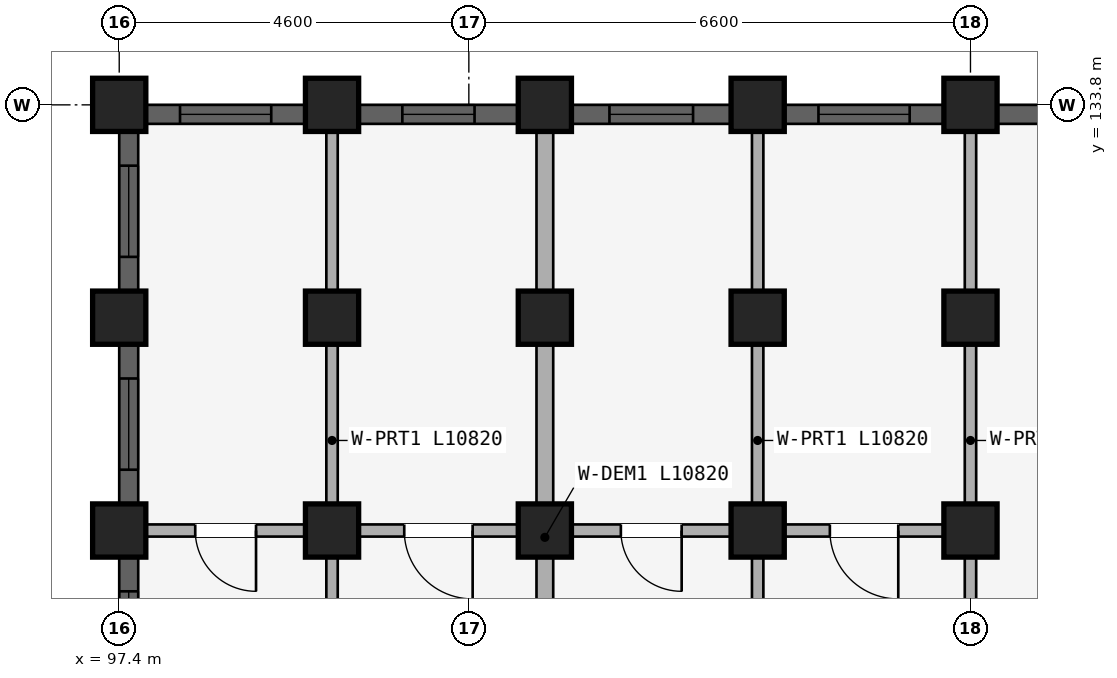
"""IFC4 building model, lengths in metres.
Left out: names, types, materials, properties, quantities, classifications, styles, units other than length and angle.
Written with IfcOpenShell. Run it as: python <this file> out.ifc"""

import sys

from ifc_helpers import new_model, si_unit, direction, frame, frame_2d, origin, origin_2d, place, context, subcontext, project, spatial, rectangle, extrude, element, fill, save


model = new_model("IFC4")
c1 = context("Model", 3, precision=1e-05, world=origin(), true_north=direction((0.0, 1.0)))
c2 = subcontext(c1, "Body", "Model", "MODEL_VIEW")
j1 = project(units=[si_unit("LENGTHUNIT", "METRE"), si_unit("PLANEANGLEUNIT", "RADIAN")], contexts=[c1])
p1 = place(None, origin())
s1 = spatial("IfcSite", under=j1, at=p1, CompositionType="ELEMENT")
p2 = place(p1, origin())
s2 = spatial("IfcBuilding", under=s1, at=p2, CompositionType="ELEMENT")
p3 = place(p2, frame((0.0, 0.0, 21.3)))
s3 = spatial("IfcBuildingStorey", under=s2, at=p3, CompositionType="ELEMENT", Elevation=21.3)
for number, where, z_axis, x_axis in (
    (1, (108.6, 128.2, 0.0), (0.0, 0.0, 1.0), (1.0, 0.0, 0.0)),
    (2, (108.6, 131.0, 0.0), (0.0, 0.0, 1.0), (1.0, 0.0, 0.0)),
    (3, (108.6, 133.8, 0.0), (0.0, 0.0, 1.0), (1.0, 0.0, 0.0)),
    (4, (105.8, 128.2, 0.0), (0.0, 0.0, 1.0), (1.0, 0.0, 0.0)),
    (5, (105.8, 131.0, 0.0), (0.0, 0.0, 1.0), (1.0, 0.0, 0.0)),
    (6, (105.8, 133.8, 0.0), (0.0, 0.0, 1.0), (1.0, 0.0, 0.0)),
    (7, (103.0, 128.2, 0.0), (0.0, 0.0, 1.0), (1.0, 0.0, 0.0)),
    (8, (103.0, 131.0, 0.0), (0.0, 0.0, 1.0), (1.0, 0.0, 0.0)),
    (9, (103.0, 133.8, 0.0), (0.0, 0.0, 1.0), (1.0, 0.0, 0.0)),
    (10, (100.2, 128.2, 0.0), (0.0, 0.0, 1.0), (1.0, 0.0, 0.0)),
    (11, (100.2, 131.0, 0.0), (0.0, 0.0, 1.0), (1.0, 0.0, 0.0)),
    (12, (100.2, 133.8, 0.0), (0.0, 0.0, 1.0), (1.0, 0.0, 0.0)),
    (13, (97.4, 128.2, 0.0), (0.0, 0.0, 1.0), (1.0, 0.0, 0.0)),
    (14, (97.4, 131.0, 0.0), (0.0, 0.0, 1.0), (1.0, 0.0, 0.0)),
    (15, (97.4, 133.8, 0.0), (0.0, 0.0, 1.0), (1.0, 0.0, 0.0)),
):
    element("IfcColumn", number, at=place(p3, frame(where, z_axis=z_axis, x_axis=x_axis)), inside=s3, PredefinedType="COLUMN", context=c2, shape_type="SweptSolid", body=[
        extrude(rectangle(XDim=0.7, YDim=0.7, at=origin_2d()), origin(), (0.0, 0.0, 1.0), 2.93),
    ])
p4 = place(p3, frame((108.52, 128.2, 0.0), z_axis=(0.0, 0.0, 1.0), x_axis=(-1.0, 0.0, 0.0)))
e16 = element("IfcWall", 16, at=p4, inside=s3, PredefinedType="PLUMBINGWALL", context=c2, shape_type="SweptSolid", body=[
    extrude(rectangle(XDim=2.64, YDim=0.16, at=frame_2d((1.32, 0.0))), origin(), (0.0, 0.0, 1.0), 2.372),
])
p5 = place(p4, frame((0.87, 0.0, 0.0)))
e17 = element("IfcOpeningElement", 17, at=p5, cuts=e16, PredefinedType="OPENING", context=c2, shape_type="SweptSolid", body=[
    extrude(rectangle(XDim=0.9, YDim=2.1, at=frame_2d((0.45, 1.05))), frame((0.0, 0.09, 0.0), z_axis=(0.0, -1.0, 0.0), x_axis=(1.0, 0.0, 0.0)), (0.0, 0.0, 1.0), 0.18),
])
p6 = place(p3, frame((105.72, 128.2, 0.0), z_axis=(0.0, 0.0, 1.0), x_axis=(-1.0, 0.0, 0.0)))
e18 = element("IfcWall", 18, at=p6, inside=s3, PredefinedType="PLUMBINGWALL", context=c2, shape_type="SweptSolid", body=[
    extrude(rectangle(XDim=2.64, YDim=0.16, at=frame_2d((1.32, 0.0))), origin(), (0.0, 0.0, 1.0), 2.372),
])
p7 = place(p6, frame((0.92, 0.0, 0.0)))
e19 = element("IfcOpeningElement", 19, at=p7, cuts=e18, PredefinedType="OPENING", context=c2, shape_type="SweptSolid", body=[
    extrude(rectangle(XDim=0.8, YDim=2.1, at=frame_2d((0.4, 1.05))), frame((0.0, 0.09, 0.0), z_axis=(0.0, -1.0, 0.0), x_axis=(1.0, 0.0, 0.0)), (0.0, 0.0, 1.0), 0.18),
])
p8 = place(p3, frame((102.92, 128.2, 0.0), z_axis=(0.0, 0.0, 1.0), x_axis=(-1.0, 0.0, 0.0)))
e20 = element("IfcWall", 20, at=p8, inside=s3, PredefinedType="PLUMBINGWALL", context=c2, shape_type="SweptSolid", body=[
    extrude(rectangle(XDim=2.64, YDim=0.16, at=frame_2d((1.32, 0.0))), origin(), (0.0, 0.0, 1.0), 2.372),
])
p9 = place(p8, frame((0.87, 0.0, 0.0)))
e21 = element("IfcOpeningElement", 21, at=p9, cuts=e20, PredefinedType="OPENING", context=c2, shape_type="SweptSolid", body=[
    extrude(rectangle(XDim=0.9, YDim=2.1, at=frame_2d((0.45, 1.05))), frame((0.0, 0.09, 0.0), z_axis=(0.0, -1.0, 0.0), x_axis=(1.0, 0.0, 0.0)), (0.0, 0.0, 1.0), 0.18),
])
p10 = place(p3, frame((100.12, 128.2, 0.0), z_axis=(0.0, 0.0, 1.0), x_axis=(-1.0, 0.0, 0.0)))
e22 = element("IfcWall", 22, at=p10, inside=s3, PredefinedType="PLUMBINGWALL", context=c2, shape_type="SweptSolid", body=[
    extrude(rectangle(XDim=2.64, YDim=0.16, at=frame_2d((1.32, 0.0))), origin(), (0.0, 0.0, 1.0), 2.372),
])
p11 = place(p10, frame((0.92, 0.0, 0.0)))
e23 = element("IfcOpeningElement", 23, at=p11, cuts=e22, PredefinedType="OPENING", context=c2, shape_type="SweptSolid", body=[
    extrude(rectangle(XDim=0.8, YDim=2.1, at=frame_2d((0.4, 1.05))), frame((0.0, 0.09, 0.0), z_axis=(0.0, -1.0, 0.0), x_axis=(1.0, 0.0, 0.0)), (0.0, 0.0, 1.0), 0.18),
])
p12 = place(p3, frame((108.6, 122.7, 0.0), z_axis=(0.0, 0.0, 1.0), x_axis=(0.0, 1.0, 0.0)))
e24 = element("IfcWall", 24, at=p12, inside=s3, PredefinedType="PARTITIONING", context=c2, shape_type="SweptSolid", body=[
    extrude(rectangle(XDim=10.82, YDim=0.15, at=frame_2d((5.41, 0.0))), origin(), (0.0, 0.0, 1.0), 2.372),
])
p13 = place(p12, frame((0.899, 0.0, 0.0)))
e25 = element("IfcOpeningElement", 25, at=p13, cuts=e24, PredefinedType="OPENING", context=c2, shape_type="SweptSolid", body=[
    extrude(rectangle(XDim=0.8, YDim=2.1, at=frame_2d((0.4, 1.05))), frame((0.0, 0.085, 0.0), z_axis=(0.0, -1.0, 0.0), x_axis=(1.0, 0.0, 0.0)), (0.0, 0.0, 1.0), 0.17),
])
p14 = place(p3, frame((105.8, 122.7, 0.0), z_axis=(0.0, 0.0, 1.0), x_axis=(0.0, 1.0, 0.0)))
e26 = element("IfcWall", 26, at=p14, inside=s3, PredefinedType="PARTITIONING", context=c2, shape_type="SweptSolid", body=[
    extrude(rectangle(XDim=10.82, YDim=0.15, at=frame_2d((5.41, 0.0))), origin(), (0.0, 0.0, 1.0), 2.372),
])
p15 = place(p14, frame((0.899, 0.0, 0.0)))
e27 = element("IfcOpeningElement", 27, at=p15, cuts=e26, PredefinedType="OPENING", context=c2, shape_type="SweptSolid", body=[
    extrude(rectangle(XDim=0.8, YDim=2.1, at=frame_2d((0.4, 1.05))), frame((0.0, 0.085, 0.0), z_axis=(0.0, -1.0, 0.0), x_axis=(1.0, 0.0, 0.0)), (0.0, 0.0, 1.0), 0.17),
])
p16 = place(p3, frame((103.0, 122.7, 0.0), z_axis=(0.0, 0.0, 1.0), x_axis=(0.0, 1.0, 0.0)))
e28 = element("IfcWall", 28, at=p16, inside=s3, PredefinedType="STANDARD", context=c2, shape_type="SweptSolid", body=[
    extrude(rectangle(XDim=10.82, YDim=0.22, at=frame_2d((5.41, 0.0))), origin(), (0.0, 0.0, 1.0), 2.372),
])
p17 = place(p3, frame((100.2, 122.7, 0.0), z_axis=(0.0, 0.0, 1.0), x_axis=(0.0, 1.0, 0.0)))
e29 = element("IfcWall", 29, at=p17, inside=s3, PredefinedType="PARTITIONING", context=c2, shape_type="SweptSolid", body=[
    extrude(rectangle(XDim=10.82, YDim=0.15, at=frame_2d((5.41, 0.0))), origin(), (0.0, 0.0, 1.0), 2.372),
])
p18 = place(p17, frame((0.899, 0.0, 0.0)))
e30 = element("IfcOpeningElement", 30, at=p18, cuts=e29, PredefinedType="OPENING", context=c2, shape_type="SweptSolid", body=[
    extrude(rectangle(XDim=0.8, YDim=2.1, at=frame_2d((0.4, 1.05))), frame((0.0, 0.085, 0.0), z_axis=(0.0, -1.0, 0.0), x_axis=(1.0, 0.0, 0.0)), (0.0, 0.0, 1.0), 0.17),
])
p19 = place(p3, frame((113.846, 133.675, 0.0), z_axis=(0.0, 0.0, 1.0), x_axis=(-1.0, 0.0, 0.0)))
e31 = element("IfcWall", 31, at=p19, inside=s3, PredefinedType="STANDARD", context=c2, shape_type="SweptSolid", body=[
    extrude(rectangle(XDim=4.893, YDim=0.25, at=frame_2d((2.446, 0.0))), origin(), (0.0, 0.0, 1.0), 2.472),
])
p20 = place(p19, frame((1.771, 0.0, 0.672)))
e32 = element("IfcOpeningElement", 32, at=p20, cuts=e31, PredefinedType="OPENING", context=c2, shape_type="SweptSolid", body=[
    extrude(rectangle(XDim=1.35, YDim=1.6, at=frame_2d((0.675, 0.8))), frame((0.0, 0.135, 0.0), z_axis=(0.0, -1.0, 0.0), x_axis=(1.0, 0.0, 0.0)), (0.0, 0.0, 1.0), 0.27),
])
p21 = place(p3, frame((108.247, 133.675, 0.0), z_axis=(0.0, 0.0, 1.0), x_axis=(-1.0, 0.0, 0.0)))
e33 = element("IfcWall", 33, at=p21, inside=s3, PredefinedType="STANDARD", context=c2, shape_type="SweptSolid", body=[
    extrude(rectangle(XDim=2.093, YDim=0.25, at=frame_2d((1.046, 0.0))), origin(), (0.0, 0.0, 1.0), 2.472),
])
p22 = place(p21, frame((0.447, 0.0, 0.772)))
e34 = element("IfcOpeningElement", 34, at=p22, cuts=e33, PredefinedType="OPENING", context=c2, shape_type="SweptSolid", body=[
    extrude(rectangle(XDim=1.2, YDim=1.5, at=frame_2d((0.6, 0.75))), frame((0.0, 0.135, 0.0), z_axis=(0.0, -1.0, 0.0), x_axis=(1.0, 0.0, 0.0)), (0.0, 0.0, 1.0), 0.27),
])
p23 = place(p3, frame((105.447, 133.675, 0.0), z_axis=(0.0, 0.0, 1.0), x_axis=(-1.0, 0.0, 0.0)))
e35 = element("IfcWall", 35, at=p23, inside=s3, PredefinedType="STANDARD", context=c2, shape_type="SweptSolid", body=[
    extrude(rectangle(XDim=2.093, YDim=0.25, at=frame_2d((1.046, 0.0))), origin(), (0.0, 0.0, 1.0), 2.472),
])
p24 = place(p23, frame((0.497, 0.0, 0.822)))
e36 = element("IfcOpeningElement", 36, at=p24, cuts=e35, PredefinedType="OPENING", context=c2, shape_type="SweptSolid", body=[
    extrude(rectangle(XDim=1.1, YDim=1.45, at=frame_2d((0.55, 0.725))), frame((0.0, 0.135, 0.0), z_axis=(0.0, -1.0, 0.0), x_axis=(1.0, 0.0, 0.0)), (0.0, 0.0, 1.0), 0.27),
])
p25 = place(p3, frame((102.646, 133.675, 0.0), z_axis=(0.0, 0.0, 1.0), x_axis=(-1.0, 0.0, 0.0)))
e37 = element("IfcWall", 37, at=p25, inside=s3, PredefinedType="STANDARD", context=c2, shape_type="SweptSolid", body=[
    extrude(rectangle(XDim=2.093, YDim=0.25, at=frame_2d((1.046, 0.0))), origin(), (0.0, 0.0, 1.0), 2.472),
])
p26 = place(p25, frame((0.572, 0.0, 0.88)))
e38 = element("IfcOpeningElement", 38, at=p26, cuts=e37, PredefinedType="OPENING", context=c2, shape_type="SweptSolid", body=[
    extrude(rectangle(XDim=0.95, YDim=1.35, at=frame_2d((0.475, 0.675))), frame((0.0, 0.135, 0.0), z_axis=(0.0, -1.0, 0.0), x_axis=(1.0, 0.0, 0.0)), (0.0, 0.0, 1.0), 0.27),
])
p27 = place(p3, frame((99.846, 133.675, 0.0), z_axis=(0.0, 0.0, 1.0), x_axis=(-1.0, 0.0, 0.0)))
e39 = element("IfcWall", 39, at=p27, inside=s3, PredefinedType="STANDARD", context=c2, shape_type="SweptSolid", body=[
    extrude(rectangle(XDim=2.093, YDim=0.25, at=frame_2d((1.046, 0.0))), origin(), (0.0, 0.0, 1.0), 2.472),
])
p28 = place(p27, frame((0.447, 0.0, 0.772)))
e40 = element("IfcOpeningElement", 40, at=p28, cuts=e39, PredefinedType="OPENING", context=c2, shape_type="SweptSolid", body=[
    extrude(rectangle(XDim=1.2, YDim=1.5, at=frame_2d((0.6, 0.75))), frame((0.0, 0.135, 0.0), z_axis=(0.0, -1.0, 0.0), x_axis=(1.0, 0.0, 0.0)), (0.0, 0.0, 1.0), 0.27),
])
p29 = place(p3, frame((97.525, 125.753, 0.0), z_axis=(0.0, 0.0, 1.0), x_axis=(0.0, 1.0, 0.0)))
e41 = element("IfcWall", 41, at=p29, inside=s3, PredefinedType="STANDARD", context=c2, shape_type="SweptSolid", body=[
    extrude(rectangle(XDim=2.093, YDim=0.25, at=frame_2d((1.046, 0.0))), origin(), (0.0, 0.0, 1.0), 2.372),
])
p30 = place(p29, frame((0.447, 0.0, 0.672)))
e42 = element("IfcOpeningElement", 42, at=p30, cuts=e41, PredefinedType="OPENING", context=c2, shape_type="SweptSolid", body=[
    extrude(rectangle(XDim=1.2, YDim=1.5, at=frame_2d((0.6, 0.75))), frame((0.0, 0.135, 0.0), z_axis=(0.0, -1.0, 0.0), x_axis=(1.0, 0.0, 0.0)), (0.0, 0.0, 1.0), 0.27),
])
p31 = place(p3, frame((97.525, 128.553, 0.0), z_axis=(0.0, 0.0, 1.0), x_axis=(0.0, 1.0, 0.0)))
e43 = element("IfcWall", 43, at=p31, inside=s3, PredefinedType="STANDARD", context=c2, shape_type="SweptSolid", body=[
    extrude(rectangle(XDim=2.093, YDim=0.25, at=frame_2d((1.046, 0.0))), origin(), (0.0, 0.0, 1.0), 2.372),
])
p32 = place(p31, frame((0.447, 0.0, 0.672)))
e44 = element("IfcOpeningElement", 44, at=p32, cuts=e43, PredefinedType="OPENING", context=c2, shape_type="SweptSolid", body=[
    extrude(rectangle(XDim=1.2, YDim=1.5, at=frame_2d((0.6, 0.75))), frame((0.0, 0.135, 0.0), z_axis=(0.0, -1.0, 0.0), x_axis=(1.0, 0.0, 0.0)), (0.0, 0.0, 1.0), 0.27),
])
p33 = place(p3, frame((97.525, 131.354, 0.0), z_axis=(0.0, 0.0, 1.0), x_axis=(0.0, 1.0, 0.0)))
e45 = element("IfcWall", 45, at=p33, inside=s3, PredefinedType="STANDARD", context=c2, shape_type="SweptSolid", body=[
    extrude(rectangle(XDim=2.093, YDim=0.25, at=frame_2d((1.046, 0.0))), origin(), (0.0, 0.0, 1.0), 2.372),
])
p34 = place(p33, frame((0.447, 0.0, 0.672)))
e46 = element("IfcOpeningElement", 46, at=p34, cuts=e45, PredefinedType="OPENING", context=c2, shape_type="SweptSolid", body=[
    extrude(rectangle(XDim=1.2, YDim=1.5, at=frame_2d((0.6, 0.75))), frame((0.0, 0.135, 0.0), z_axis=(0.0, -1.0, 0.0), x_axis=(1.0, 0.0, 0.0)), (0.0, 0.0, 1.0), 0.27),
])
p35 = place(p22, origin())
e47 = element("IfcWindow", 47, at=p35, inside=s3, PartitioningType="SINGLE_PANEL", PredefinedType="WINDOW", context=c2, shape_type="SweptSolid", body=[
    extrude(rectangle(XDim=1.2, YDim=1.5, at=frame_2d((0.6, 0.75))), frame((0.0, 0.03, 0.0), z_axis=(0.0, -1.0, 0.0), x_axis=(1.0, 0.0, 0.0)), (0.0, 0.0, 1.0), 0.06),
])
fill(e34, e47)
p36 = place(p24, origin())
e48 = element("IfcWindow", 48, at=p36, inside=s3, PartitioningType="SINGLE_PANEL", PredefinedType="WINDOW", context=c2, shape_type="SweptSolid", body=[
    extrude(rectangle(XDim=1.1, YDim=1.45, at=frame_2d((0.55, 0.725))), frame((0.0, 0.03, 0.0), z_axis=(0.0, -1.0, 0.0), x_axis=(1.0, 0.0, 0.0)), (0.0, 0.0, 1.0), 0.06),
])
fill(e36, e48)
p37 = place(p26, origin())
e49 = element("IfcWindow", 49, at=p37, inside=s3, PartitioningType="SINGLE_PANEL", PredefinedType="WINDOW", context=c2, shape_type="SweptSolid", body=[
    extrude(rectangle(XDim=0.95, YDim=1.35, at=frame_2d((0.475, 0.675))), frame((0.0, 0.03, 0.0), z_axis=(0.0, -1.0, 0.0), x_axis=(1.0, 0.0, 0.0)), (0.0, 0.0, 1.0), 0.06),
])
fill(e38, e49)
p38 = place(p28, origin())
e50 = element("IfcWindow", 50, at=p38, inside=s3, PartitioningType="SINGLE_PANEL", PredefinedType="WINDOW", context=c2, shape_type="SweptSolid", body=[
    extrude(rectangle(XDim=1.2, YDim=1.5, at=frame_2d((0.6, 0.75))), frame((0.0, 0.03, 0.0), z_axis=(0.0, -1.0, 0.0), x_axis=(1.0, 0.0, 0.0)), (0.0, 0.0, 1.0), 0.06),
])
fill(e40, e50)
p39 = place(p30, origin())
e51 = element("IfcWindow", 51, at=p39, inside=s3, PartitioningType="SINGLE_PANEL", PredefinedType="WINDOW", context=c2, shape_type="SweptSolid", body=[
    extrude(rectangle(XDim=1.2, YDim=1.5, at=frame_2d((0.6, 0.75))), frame((0.0, 0.03, 0.0), z_axis=(0.0, -1.0, 0.0), x_axis=(1.0, 0.0, 0.0)), (0.0, 0.0, 1.0), 0.06),
])
fill(e42, e51)
p40 = place(p32, origin())
e52 = element("IfcWindow", 52, at=p40, inside=s3, PartitioningType="SINGLE_PANEL", PredefinedType="WINDOW", context=c2, shape_type="SweptSolid", body=[
    extrude(rectangle(XDim=1.2, YDim=1.5, at=frame_2d((0.6, 0.75))), frame((0.0, 0.03, 0.0), z_axis=(0.0, -1.0, 0.0), x_axis=(1.0, 0.0, 0.0)), (0.0, 0.0, 1.0), 0.06),
])
fill(e44, e52)
p41 = place(p34, origin())
e53 = element("IfcWindow", 53, at=p41, inside=s3, PartitioningType="SINGLE_PANEL", PredefinedType="WINDOW", context=c2, shape_type="SweptSolid", body=[
    extrude(rectangle(XDim=1.2, YDim=1.5, at=frame_2d((0.6, 0.75))), frame((0.0, 0.03, 0.0), z_axis=(0.0, -1.0, 0.0), x_axis=(1.0, 0.0, 0.0)), (0.0, 0.0, 1.0), 0.06),
])
fill(e46, e53)
p42 = place(p5, origin())
e54 = element("IfcDoor", 54, at=p42, inside=s3, OperationType="SINGLE_SWING_LEFT", PredefinedType="DOOR", context=c2, shape_type="SweptSolid", body=[
    extrude(rectangle(XDim=0.9, YDim=2.1, at=frame_2d((0.45, 1.05))), frame((0.0, 0.025, 0.0), z_axis=(0.0, -1.0, 0.0), x_axis=(1.0, 0.0, 0.0)), (0.0, 0.0, 1.0), 0.05),
])
fill(e17, e54)
p43 = place(p7, origin())
e55 = element("IfcDoor", 55, at=p43, inside=s3, OperationType="SINGLE_SWING_LEFT", PredefinedType="DOOR", context=c2, shape_type="SweptSolid", body=[
    extrude(rectangle(XDim=0.8, YDim=2.1, at=frame_2d((0.4, 1.05))), frame((0.0, 0.025, 0.0), z_axis=(0.0, -1.0, 0.0), x_axis=(1.0, 0.0, 0.0)), (0.0, 0.0, 1.0), 0.05),
])
fill(e19, e55)
p44 = place(p9, origin())
e56 = element("IfcDoor", 56, at=p44, inside=s3, OperationType="SINGLE_SWING_LEFT", PredefinedType="DOOR", context=c2, shape_type="SweptSolid", body=[
    extrude(rectangle(XDim=0.9, YDim=2.1, at=frame_2d((0.45, 1.05))), frame((0.0, 0.025, 0.0), z_axis=(0.0, -1.0, 0.0), x_axis=(1.0, 0.0, 0.0)), (0.0, 0.0, 1.0), 0.05),
])
fill(e21, e56)
p45 = place(p11, origin())
e57 = element("IfcDoor", 57, at=p45, inside=s3, OperationType="SINGLE_SWING_LEFT", PredefinedType="DOOR", context=c2, shape_type="SweptSolid", body=[
    extrude(rectangle(XDim=0.8, YDim=2.1, at=frame_2d((0.4, 1.05))), frame((0.0, 0.025, 0.0), z_axis=(0.0, -1.0, 0.0), x_axis=(1.0, 0.0, 0.0)), (0.0, 0.0, 1.0), 0.05),
])
fill(e23, e57)
save(model, sys.argv[1])
